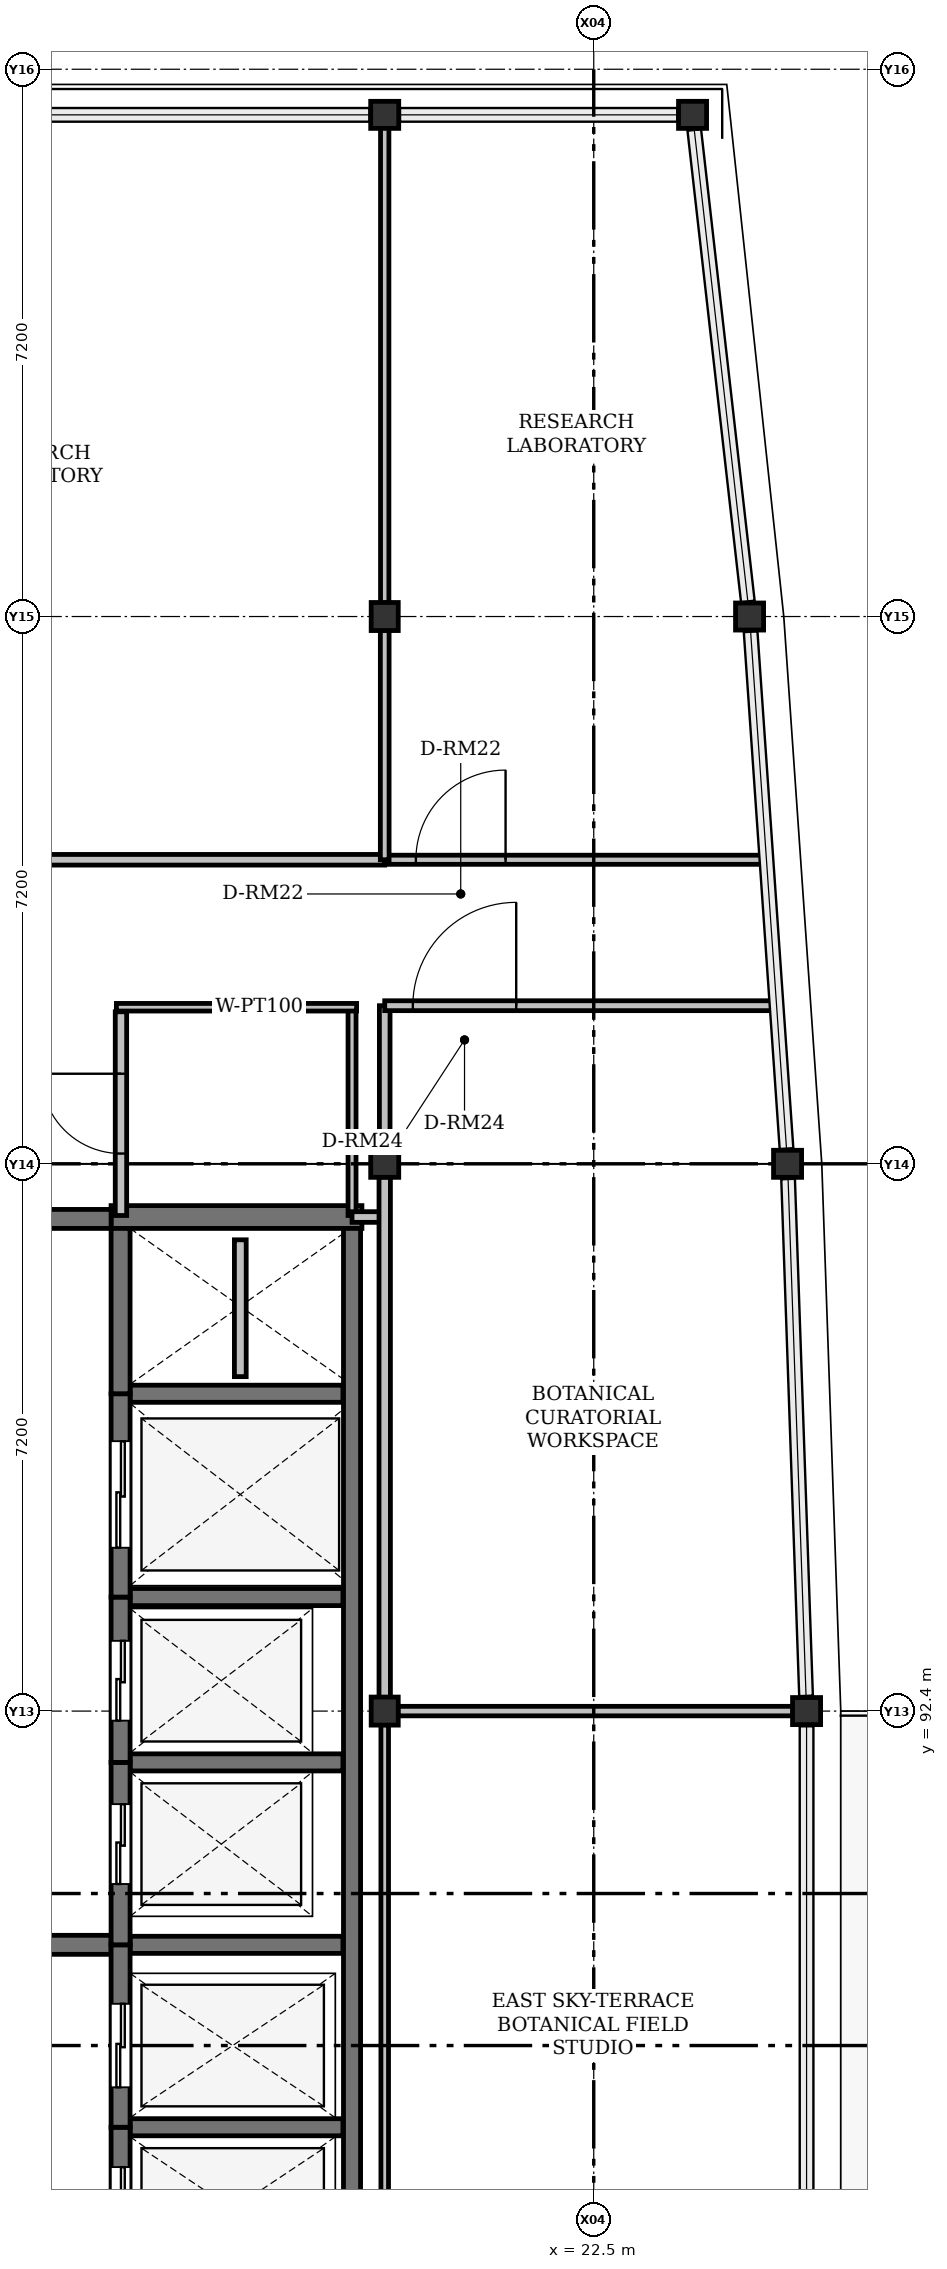
"""IFC4 building model, lengths in metres.
Left out: names, types, materials, properties, quantities, classifications, styles, units other than length and angle.
Written with IfcOpenShell. Run it as: python <this file> out.ifc"""

import sys

from ifc_helpers import new_model, si_unit, direction, frame, frame_2d, origin, origin_2d, place, context, subcontext, project, spatial, rectangle, i_section, extrude, element, fill, save


model = new_model("IFC4")
c1 = context("Model", 3, precision=1e-05, world=origin(), true_north=direction((0.0, 1.0)))
c2 = subcontext(c1, "Body", "Model", "MODEL_VIEW")
j1 = project(units=[si_unit("LENGTHUNIT", "METRE"), si_unit("PLANEANGLEUNIT", "RADIAN")], contexts=[c1])
p1 = place(None, origin())
s1 = spatial("IfcSite", under=j1, at=p1, CompositionType="ELEMENT")
p2 = place(p1, origin())
s2 = spatial("IfcBuilding", under=s1, at=p2, CompositionType="ELEMENT")
p3 = place(p2, frame((0.0, 0.0, 47.7)))
s3 = spatial("IfcBuildingStorey", under=s2, at=p3, CompositionType="ELEMENT", Elevation=47.7)
for number, where, z_axis, x_axis in (
    (1, (19.75, 92.4, 0.0), (0.0, 0.0, 1.0), (0.0, 1.0, 0.0)),
    (2, (25.3, 92.4, 0.0), (0.0, 0.0, 1.0), (1.0, 0.0, 0.0)),
    (3, (19.75, 99.6, 0.0), (0.0, 0.0, 1.0), (1.0, 0.0, 0.0)),
    (4, (25.05, 99.6, 0.0), (0.0, 0.0, 1.0), (1.0, 0.0, 0.0)),
    (5, (19.75, 106.8, 0.0), (0.0, 0.0, 1.0), (0.0, 1.0, 0.0)),
    (6, (24.55, 106.8, 0.0), (0.0, 0.0, 1.0), (1.0, 0.0, 0.0)),
    (7, (19.75, 113.4, 0.0), (0.0, 0.0, 1.0), (1.0, 0.0, 0.0)),
    (8, (23.8, 113.4, 0.0), (0.0, 0.0, 1.0), (1.0, 0.0, 0.0)),
):
    element("IfcColumn", number, at=place(p3, frame(where, z_axis=z_axis, x_axis=x_axis)), inside=s3, PredefinedType="COLUMN", context=c2, shape_type="SweptSolid", body=[
        extrude(i_section(OverallWidth=0.369, OverallDepth=0.356, WebThickness=0.011, FlangeThickness=0.018, FilletRadius=0.015, at=origin_2d()), origin(), (0.0, 0.0, 1.0), 4.2),
    ])
p4 = place(p3, frame((16.15, 98.9, 0.0), z_axis=(0.0, 0.0, 1.0), x_axis=(1.0, 0.0, 0.0)))
e9 = element("IfcWall", 9, at=p4, inside=s3, PredefinedType="SHEAR", context=c2, shape_type="SweptSolid", body=[
    extrude(rectangle(XDim=3.3, YDim=0.3, at=frame_2d((1.65, 0.0))), origin(), (0.0, 0.0, 1.0), 4.2),
])
p5 = place(p3, frame((12.12, 98.875, 0.0), z_axis=(0.0, 0.0, 1.0), x_axis=(1.0, 0.0, 0.0)))
e10 = element("IfcWall", 10, at=p5, inside=s3, PredefinedType="SHEAR", context=c2, shape_type="SweptSolid", body=[
    extrude(rectangle(XDim=4.03, YDim=0.25, at=frame_2d((2.015, 0.0))), origin(), (0.0, 0.0, 1.0), 4.2),
])
p6 = place(p5, frame((1.35, 0.0, 0.0)))
e11 = element("IfcOpeningElement", 11, at=p6, cuts=e10, PredefinedType="OPENING", context=c2, shape_type="SweptSolid", body=[
    extrude(rectangle(XDim=1.3, YDim=2.2, at=frame_2d((0.65, 1.1))), frame((0.0, 0.125, 0.0), z_axis=(0.0, -1.0, 0.0), x_axis=(1.0, 0.0, 0.0)), (0.0, 0.0, 1.0), 0.25),
])
p7 = place(p3, frame((12.12, 89.325, 0.0), z_axis=(0.0, 0.0, 1.0), x_axis=(1.0, 0.0, 0.0)))
e12 = element("IfcWall", 12, at=p7, inside=s3, PredefinedType="SHEAR", context=c2, shape_type="SweptSolid", body=[
    extrude(rectangle(XDim=4.03, YDim=0.25, at=frame_2d((2.015, 0.0))), origin(), (0.0, 0.0, 1.0), 4.2),
])
p8 = place(p7, frame((1.35, 0.0, 0.0)))
e13 = element("IfcOpeningElement", 13, at=p8, cuts=e12, PredefinedType="OPENING", context=c2, shape_type="SweptSolid", body=[
    extrude(rectangle(XDim=1.3, YDim=2.2, at=frame_2d((0.65, 1.1))), frame((0.0, 0.125, 0.0), z_axis=(0.0, -1.0, 0.0), x_axis=(1.0, 0.0, 0.0)), (0.0, 0.0, 1.0), 0.25),
])
p9 = place(p3, frame((19.32, 84.8, 0.0), z_axis=(0.0, 0.0, 1.0), x_axis=(0.0, 1.0, 0.0)))
e14 = element("IfcWall", 14, at=p9, inside=s3, PredefinedType="SHEAR", context=c2, shape_type="SweptSolid", body=[
    extrude(rectangle(XDim=13.95, YDim=0.225, at=frame_2d((6.975, 0.0))), origin(), (0.0, 0.0, 1.0), 4.2),
])
for number, where, z_axis, x_axis in (
    (15, (16.4, 86.925, 0.0), (0.0, 0.0, 1.0), (1.0, 0.0, 0.0)),
    (16, (16.4, 89.325, 0.0), (0.0, 0.0, 1.0), (1.0, 0.0, 0.0)),
    (17, (16.4, 91.725, 0.0), (0.0, 0.0, 1.0), (1.0, 0.0, 0.0)),
    (18, (16.4, 93.9, 0.0), (0.0, 0.0, 1.0), (1.0, 0.0, 0.0)),
    (19, (16.4, 96.575, 0.0), (0.0, 0.0, 1.0), (1.0, 0.0, 0.0)),
):
    element("IfcWall", number, at=place(p3, frame(where, z_axis=z_axis, x_axis=x_axis)), inside=s3, PredefinedType="SHEAR", context=c2, shape_type="SweptSolid", body=[
        extrude(rectangle(XDim=2.8, YDim=0.225, at=frame_2d((1.4, 0.0))), origin(), (0.0, 0.0, 1.0), 4.2),
    ])
p10 = place(p3, frame((16.275, 84.8, 0.0), z_axis=(0.0, 0.0, 1.0), x_axis=(0.0, 1.0, 0.0)))
e20 = element("IfcWall", 20, at=p10, inside=s3, PredefinedType="SHEAR", context=c2, shape_type="SweptSolid", body=[
    extrude(rectangle(XDim=2.125, YDim=0.25, at=frame_2d((1.062, 0.0))), origin(), (0.0, 0.0, 1.0), 4.2),
])
p11 = place(p10, frame((0.5, 0.0, 0.0)))
e21 = element("IfcOpeningElement", 21, at=p11, cuts=e20, PredefinedType="OPENING", context=c2, shape_type="SweptSolid", body=[
    extrude(rectangle(XDim=1.1, YDim=2.15, at=frame_2d((0.55, 1.075))), frame((0.0, 0.125, 0.0), z_axis=(0.0, -1.0, 0.0), x_axis=(1.0, 0.0, 0.0)), (0.0, 0.0, 1.0), 0.25),
])
p12 = place(p3, frame((16.275, 86.925, 0.0), z_axis=(0.0, 0.0, 1.0), x_axis=(0.0, 1.0, 0.0)))
e22 = element("IfcWall", 22, at=p12, inside=s3, PredefinedType="SHEAR", context=c2, shape_type="SweptSolid", body=[
    extrude(rectangle(XDim=2.4, YDim=0.25, at=frame_2d((1.2, 0.0))), origin(), (0.0, 0.0, 1.0), 4.2),
])
p13 = place(p12, frame((0.525, 0.0, 0.0)))
e23 = element("IfcOpeningElement", 23, at=p13, cuts=e22, PredefinedType="OPENING", context=c2, shape_type="SweptSolid", body=[
    extrude(rectangle(XDim=1.1, YDim=2.15, at=frame_2d((0.55, 1.075))), frame((0.0, 0.125, 0.0), z_axis=(0.0, -1.0, 0.0), x_axis=(1.0, 0.0, 0.0)), (0.0, 0.0, 1.0), 0.25),
])
p14 = place(p3, frame((16.275, 89.325, 0.0), z_axis=(0.0, 0.0, 1.0), x_axis=(0.0, 1.0, 0.0)))
e24 = element("IfcWall", 24, at=p14, inside=s3, PredefinedType="SHEAR", context=c2, shape_type="SweptSolid", body=[
    extrude(rectangle(XDim=2.4, YDim=0.25, at=frame_2d((1.2, 0.0))), origin(), (0.0, 0.0, 1.0), 4.2),
])
p15 = place(p14, frame((0.8, 0.0, 0.0)))
e25 = element("IfcOpeningElement", 25, at=p15, cuts=e24, PredefinedType="OPENING", context=c2, shape_type="SweptSolid", body=[
    extrude(rectangle(XDim=1.05, YDim=2.15, at=frame_2d((0.525, 1.075))), frame((0.0, 0.125, 0.0), z_axis=(0.0, -1.0, 0.0), x_axis=(1.0, 0.0, 0.0)), (0.0, 0.0, 1.0), 0.25),
])
p16 = place(p3, frame((16.275, 91.725, 0.0), z_axis=(0.0, 0.0, 1.0), x_axis=(0.0, 1.0, 0.0)))
e26 = element("IfcWall", 26, at=p16, inside=s3, PredefinedType="SHEAR", context=c2, shape_type="SweptSolid", body=[
    extrude(rectangle(XDim=2.175, YDim=0.25, at=frame_2d((1.087, 0.0))), origin(), (0.0, 0.0, 1.0), 4.2),
])
p17 = place(p16, frame((0.55, 0.0, 0.0)))
e27 = element("IfcOpeningElement", 27, at=p17, cuts=e26, PredefinedType="OPENING", context=c2, shape_type="SweptSolid", body=[
    extrude(rectangle(XDim=1.05, YDim=2.15, at=frame_2d((0.525, 1.075))), frame((0.0, 0.125, 0.0), z_axis=(0.0, -1.0, 0.0), x_axis=(1.0, 0.0, 0.0)), (0.0, 0.0, 1.0), 0.25),
])
p18 = place(p3, frame((16.275, 93.9, 0.0), z_axis=(0.0, 0.0, 1.0), x_axis=(0.0, 1.0, 0.0)))
e28 = element("IfcWall", 28, at=p18, inside=s3, PredefinedType="SHEAR", context=c2, shape_type="SweptSolid", body=[
    extrude(rectangle(XDim=2.675, YDim=0.25, at=frame_2d((1.337, 0.0))), origin(), (0.0, 0.0, 1.0), 4.2),
])
p19 = place(p18, frame((0.65, 0.0, 0.0)))
e29 = element("IfcOpeningElement", 29, at=p19, cuts=e28, PredefinedType="OPENING", context=c2, shape_type="SweptSolid", body=[
    extrude(rectangle(XDim=1.4, YDim=2.25, at=frame_2d((0.7, 1.125))), frame((0.0, 0.125, 0.0), z_axis=(0.0, -1.0, 0.0), x_axis=(1.0, 0.0, 0.0)), (0.0, 0.0, 1.0), 0.25),
])
p20 = place(p3, frame((16.275, 96.575, 0.0), z_axis=(0.0, 0.0, 1.0), x_axis=(0.0, 1.0, 0.0)))
e30 = element("IfcWall", 30, at=p20, inside=s3, PredefinedType="SHEAR", context=c2, shape_type="SweptSolid", body=[
    extrude(rectangle(XDim=2.175, YDim=0.25, at=frame_2d((1.087, 0.0))), origin(), (0.0, 0.0, 1.0), 4.2),
])
p21 = place(p3, frame((17.85, 96.8, 0.0), z_axis=(0.0, 0.0, 1.0), x_axis=(0.0, 1.0, 0.0)))
e31 = element("IfcWall", 31, at=p21, inside=s3, PredefinedType="PLUMBINGWALL", context=c2, shape_type="SweptSolid", body=[
    extrude(rectangle(XDim=1.8, YDim=0.155, at=frame_2d((0.9, 0.0))), origin(), (0.0, 0.0, 1.0), 4.2),
])
p22 = place(p3, frame((19.32, 98.92, 0.0), z_axis=(0.0, 0.0, 1.0), x_axis=(0.0, 1.0, 0.0)))
e32 = element("IfcWall", 32, at=p22, inside=s3, PredefinedType="PARTITIONING", context=c2, shape_type="SweptSolid", body=[
    extrude(rectangle(XDim=2.74, YDim=0.105, at=frame_2d((1.37, 0.0))), origin(), (0.0, 0.0, 1.0), 3.451),
])
p23 = place(p3, frame((19.38, 101.66, 0.0), z_axis=(0.0, 0.0, 1.0), x_axis=(-1.0, 0.0, 0.0)))
e33 = element("IfcWall", 33, at=p23, inside=s3, PredefinedType="PARTITIONING", context=c2, shape_type="SweptSolid", body=[
    extrude(rectangle(XDim=3.16, YDim=0.1, at=frame_2d((1.58, 0.0))), origin(), (0.0, 0.0, 1.0), 3.95),
])
p24 = place(p3, frame((16.28, 98.92, 0.0), z_axis=(0.0, 0.0, 1.0), x_axis=(0.0, 1.0, 0.0)))
e34 = element("IfcWall", 34, at=p24, inside=s3, PredefinedType="PARTITIONING", context=c2, shape_type="SweptSolid", body=[
    extrude(rectangle(XDim=2.68, YDim=0.15, at=frame_2d((1.34, 0.0))), origin(), (0.0, 0.0, 1.0), 3.451),
])
p25 = place(p24, frame((0.815, 0.0, 0.0)))
e35 = element("IfcOpeningElement", 35, at=p25, cuts=e34, PredefinedType="OPENING", context=c2, shape_type="SweptSolid", body=[
    extrude(rectangle(XDim=1.05, YDim=2.2, at=frame_2d((0.525, 1.1))), frame((0.0, 0.075, 0.0), z_axis=(0.0, -1.0, 0.0), x_axis=(1.0, 0.0, 0.0)), (0.0, 0.0, 1.0), 0.15),
])
p26 = place(p3, frame((19.75, 98.9, 0.0), z_axis=(0.0, 0.0, 1.0), x_axis=(-1.0, 0.0, 0.0)))
e36 = element("IfcWall", 36, at=p26, inside=s3, PredefinedType="PARTITIONING", context=c2, shape_type="SweptSolid", body=[
    extrude(rectangle(XDim=0.43, YDim=0.14, at=frame_2d((0.215, 0.0))), origin(), (0.0, 0.0, 1.0), 3.527),
])
p27 = place(p3, frame((7.85, 103.6, 0.0), z_axis=(0.0, 0.0, 1.0), x_axis=(1.0, 0.0, 0.0)))
e37 = element("IfcWall", 37, at=p27, inside=s3, PredefinedType="PARTITIONING", context=c2, shape_type="SweptSolid", body=[
    extrude(rectangle(XDim=11.9, YDim=0.14, at=frame_2d((5.95, 0.0))), origin(), (0.0, 0.0, 1.0), 3.527),
])
p28 = place(p27, frame((2.19, 0.0, 0.0)))
e38 = element("IfcOpeningElement", 38, at=p28, cuts=e37, PredefinedType="OPENING", context=c2, shape_type="SweptSolid", body=[
    extrude(rectangle(XDim=1.12, YDim=2.25, at=frame_2d((0.56, 1.125))), frame((0.0, 0.07, 0.0), z_axis=(0.0, -1.0, 0.0), x_axis=(1.0, 0.0, 0.0)), (0.0, 0.0, 1.0), 0.14),
])
p29 = place(p27, frame((4.16, 0.0, 0.92)))
e39 = element("IfcOpeningElement", 39, at=p29, cuts=e37, PredefinedType="OPENING", context=c2, shape_type="SweptSolid", body=[
    extrude(rectangle(XDim=1.05, YDim=1.2, at=frame_2d((0.525, 0.6))), frame((0.0, 0.07, 0.0), z_axis=(0.0, -1.0, 0.0), x_axis=(1.0, 0.0, 0.0)), (0.0, 0.0, 1.0), 0.14),
])
p30 = place(p3, frame((19.75, 103.6, 0.0), z_axis=(0.0, 0.0, 1.0), x_axis=(1.0, 0.0, 0.0)))
e40 = element("IfcWall", 40, at=p30, inside=s3, PredefinedType="PARTITIONING", context=c2, shape_type="SweptSolid", body=[
    extrude(rectangle(XDim=5.04, YDim=0.12, at=frame_2d((2.52, 0.0))), origin(), (0.0, 0.0, 1.0), 3.527),
])
p31 = place(p30, frame((0.41, 0.0, 0.0)))
e41 = element("IfcOpeningElement", 41, at=p31, cuts=e40, PredefinedType="OPENING", context=c2, shape_type="SweptSolid", body=[
    extrude(rectangle(XDim=1.18, YDim=2.25, at=frame_2d((0.59, 1.125))), frame((0.0, 0.06, 0.0), z_axis=(0.0, -1.0, 0.0), x_axis=(1.0, 0.0, 0.0)), (0.0, 0.0, 1.0), 0.12),
])
p32 = place(p3, frame((19.75, 106.621, 0.0), z_axis=(0.0, 0.0, 1.0), x_axis=(0.0, -1.0, 0.0)))
e42 = element("IfcWall", 42, at=p32, inside=s3, PredefinedType="PARTITIONING", context=c2, shape_type="SweptSolid", body=[
    extrude(rectangle(XDim=3.021, YDim=0.115, at=frame_2d((1.51, 0.0))), origin(), (0.0, 0.0, 1.0), 3.527),
])
p33 = place(p3, frame((19.75, 113.35, 0.0), z_axis=(0.0, 0.0, 1.0), x_axis=(0.0, -1.0, 0.0)))
e43 = element("IfcWall", 43, at=p33, inside=s3, PredefinedType="PARTITIONING", context=c2, shape_type="SweptSolid", body=[
    extrude(rectangle(XDim=6.371, YDim=0.11, at=frame_2d((3.185, 0.0))), origin(), (0.0, 0.0, 1.0), 3.527),
])
p34 = place(p3, frame((19.75, 85.373, 0.0), z_axis=(0.0, 0.0, 1.0), x_axis=(0.0, 1.0, 0.0)))
e44 = element("IfcWall", 44, at=p34, inside=s3, PredefinedType="PARTITIONING", context=c2, shape_type="SweptSolid", body=[
    extrude(rectangle(XDim=6.847, YDim=0.1, at=frame_2d((3.424, 0.0))), origin(), (0.0, 0.0, 1.0), 3.527),
])
p35 = place(p3, frame((19.75, 92.58, 0.0), z_axis=(0.0, 0.0, 1.0), x_axis=(0.0, 1.0, 0.0)))
e45 = element("IfcWall", 45, at=p35, inside=s3, PredefinedType="PARTITIONING", context=c2, shape_type="SweptSolid", body=[
    extrude(rectangle(XDim=6.847, YDim=0.15, at=frame_2d((3.424, 0.0))), origin(), (0.0, 0.0, 1.0), 3.527),
])
p36 = place(p3, frame((19.75, 99.773, 0.0), z_axis=(0.0, 0.0, 1.0), x_axis=(0.0, 1.0, 0.0)))
e46 = element("IfcWall", 46, at=p36, inside=s3, PredefinedType="PARTITIONING", context=c2, shape_type="SweptSolid", body=[
    extrude(rectangle(XDim=1.907, YDim=0.14, at=frame_2d((0.954, 0.0))), origin(), (0.0, 0.0, 1.0), 3.527),
])
p37 = place(p3, frame((19.75, 101.68, 0.0), z_axis=(0.0, 0.0, 1.0), x_axis=(1.0, 0.0, 0.0)))
e47 = element("IfcWall", 47, at=p37, inside=s3, PredefinedType="PARTITIONING", context=c2, shape_type="SweptSolid", body=[
    extrude(rectangle(XDim=5.165, YDim=0.13, at=frame_2d((2.583, 0.0))), origin(), (0.0, 0.0, 1.0), 3.527),
])
p38 = place(p37, frame((0.37, 0.0, 0.0)))
e48 = element("IfcOpeningElement", 48, at=p38, cuts=e47, PredefinedType="OPENING", context=c2, shape_type="SweptSolid", body=[
    extrude(rectangle(XDim=1.36, YDim=2.25, at=frame_2d((0.68, 1.125))), frame((0.0, 0.065, 0.0), z_axis=(0.0, -1.0, 0.0), x_axis=(1.0, 0.0, 0.0)), (0.0, 0.0, 1.0), 0.13),
])
p39 = place(p3, frame((25.121, 92.4, 0.0), z_axis=(0.0, 0.0, 1.0), x_axis=(-1.0, 0.0, 0.0)))
e49 = element("IfcWall", 49, at=p39, inside=s3, PredefinedType="PARTITIONING", context=c2, shape_type="SweptSolid", body=[
    extrude(rectangle(XDim=5.198, YDim=0.125, at=frame_2d((2.599, 0.0))), origin(), (0.0, 0.0, 1.0), 3.451),
])
p40 = place(p11, origin())
e50 = element("IfcDoor", 50, at=p40, inside=s3, OperationType="SLIDING_TO_LEFT", PredefinedType="DOOR", context=c2, shape_type="SweptSolid", body=[
    extrude(rectangle(XDim=1.1, YDim=2.15, at=frame_2d((0.55, 1.075))), frame((0.0, 0.025, 0.0), z_axis=(0.0, -1.0, 0.0), x_axis=(1.0, 0.0, 0.0)), (0.0, 0.0, 1.0), 0.05),
])
fill(e21, e50)
p41 = place(p13, origin())
e51 = element("IfcDoor", 51, at=p41, inside=s3, OperationType="SLIDING_TO_LEFT", PredefinedType="DOOR", context=c2, shape_type="SweptSolid", body=[
    extrude(rectangle(XDim=1.1, YDim=2.15, at=frame_2d((0.55, 1.075))), frame((0.0, 0.025, 0.0), z_axis=(0.0, -1.0, 0.0), x_axis=(1.0, 0.0, 0.0)), (0.0, 0.0, 1.0), 0.05),
])
fill(e23, e51)
p42 = place(p15, origin())
e52 = element("IfcDoor", 52, at=p42, inside=s3, OperationType="SLIDING_TO_LEFT", PredefinedType="DOOR", context=c2, shape_type="SweptSolid", body=[
    extrude(rectangle(XDim=1.05, YDim=2.15, at=frame_2d((0.525, 1.075))), frame((0.0, 0.025, 0.0), z_axis=(0.0, -1.0, 0.0), x_axis=(1.0, 0.0, 0.0)), (0.0, 0.0, 1.0), 0.05),
])
fill(e25, e52)
p43 = place(p17, origin())
e53 = element("IfcDoor", 53, at=p43, inside=s3, OperationType="SLIDING_TO_LEFT", PredefinedType="DOOR", context=c2, shape_type="SweptSolid", body=[
    extrude(rectangle(XDim=1.05, YDim=2.15, at=frame_2d((0.525, 1.075))), frame((0.0, 0.025, 0.0), z_axis=(0.0, -1.0, 0.0), x_axis=(1.0, 0.0, 0.0)), (0.0, 0.0, 1.0), 0.05),
])
fill(e27, e53)
p44 = place(p19, origin())
e54 = element("IfcDoor", 54, at=p44, inside=s3, OperationType="SLIDING_TO_LEFT", PredefinedType="DOOR", context=c2, shape_type="SweptSolid", body=[
    extrude(rectangle(XDim=1.4, YDim=2.25, at=frame_2d((0.7, 1.125))), frame((0.0, 0.025, 0.0), z_axis=(0.0, -1.0, 0.0), x_axis=(1.0, 0.0, 0.0)), (0.0, 0.0, 1.0), 0.05),
])
fill(e29, e54)
p45 = place(p25, origin())
e55 = element("IfcDoor", 55, at=p45, inside=s3, OperationType="SINGLE_SWING_RIGHT", PredefinedType="DOOR", context=c2, shape_type="SweptSolid", body=[
    extrude(rectangle(XDim=1.05, YDim=2.2, at=frame_2d((0.525, 1.1))), frame((0.0, 0.025, 0.0), z_axis=(0.0, -1.0, 0.0), x_axis=(1.0, 0.0, 0.0)), (0.0, 0.0, 1.0), 0.05),
])
fill(e35, e55)
p46 = place(p31, origin())
e56 = element("IfcDoor", 56, at=p46, inside=s3, OperationType="SINGLE_SWING_RIGHT", PredefinedType="DOOR", context=c2, shape_type="SweptSolid", body=[
    extrude(rectangle(XDim=1.18, YDim=2.25, at=frame_2d((0.59, 1.125))), frame((0.0, 0.025, 0.0), z_axis=(0.0, -1.0, 0.0), x_axis=(1.0, 0.0, 0.0)), (0.0, 0.0, 1.0), 0.05),
])
fill(e41, e56)
p47 = place(p38, origin())
e57 = element("IfcDoor", 57, at=p47, inside=s3, OperationType="SINGLE_SWING_RIGHT", PredefinedType="DOOR", context=c2, shape_type="SweptSolid", body=[
    extrude(rectangle(XDim=1.36, YDim=2.25, at=frame_2d((0.68, 1.125))), frame((0.0, 0.025, 0.0), z_axis=(0.0, -1.0, 0.0), x_axis=(1.0, 0.0, 0.0)), (0.0, 0.0, 1.0), 0.05),
])
fill(e48, e57)
save(model, sys.argv[1])
